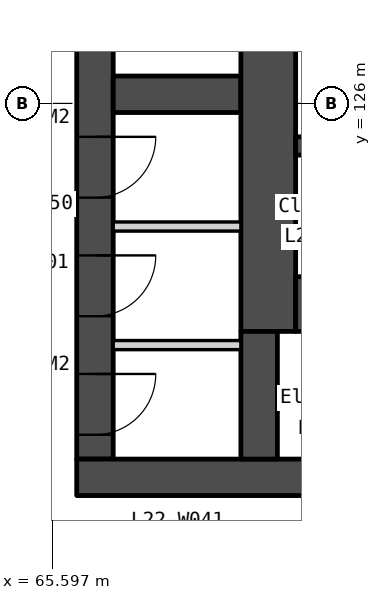
"""IFC4 building model, lengths in metres.
Left out: names, types, materials, properties, quantities, classifications, styles, units other than length and angle.
Written with IfcOpenShell. Run it as: python <this file> out.ifc"""

import sys

from ifc_helpers import new_model, si_unit, direction, frame, frame_2d, origin, place, context, subcontext, project, spatial, polyline, rectangle, outline, extrude, element, fill, save


model = new_model("IFC4")
c1 = context("Model", 3, precision=1e-05, world=origin(), true_north=direction((0.0, 1.0)))
c2 = subcontext(c1, "Body", "Model", "MODEL_VIEW")
j1 = project(units=[si_unit("LENGTHUNIT", "METRE"), si_unit("PLANEANGLEUNIT", "RADIAN")], contexts=[c1])
p1 = place(None, origin())
s1 = spatial("IfcSite", under=j1, at=p1, CompositionType="ELEMENT")
p2 = place(p1, origin())
s2 = spatial("IfcBuilding", under=s1, at=p2, CompositionType="ELEMENT")
p3 = place(p2, frame((0.0, 0.0, 92.3)))
s3 = spatial("IfcBuildingStorey", under=s2, at=p3, CompositionType="ELEMENT", Elevation=92.3)
p4 = place(p3, frame((66.3, 133.95, 0.0), z_axis=(0.0, 0.0, 1.0), x_axis=(0.0, -1.0, 0.0)))
e1 = element("IfcWall", 1, at=p4, inside=s3, PredefinedType="SOLIDWALL", context=c2, shape_type="SweptSolid", body=[
    extrude(rectangle(XDim=13.8, YDim=0.6, at=frame_2d((6.9, 0.0))), origin(), (0.0, 0.0, 1.0), 3.35),
])
p5 = place(p4, frame((0.6, 0.0, 0.0)))
e2 = element("IfcOpeningElement", 2, at=p5, cuts=e1, PredefinedType="OPENING", context=c2, shape_type="SweptSolid", body=[
    extrude(rectangle(XDim=1.1, YDim=2.1, at=frame_2d((0.55, 1.05))), frame((0.0, 0.31, 0.0), z_axis=(0.0, -1.0, 0.0), x_axis=(1.0, 0.0, 0.0)), (0.0, 0.0, 1.0), 0.62),
])
p6 = place(p4, frame((12.4, 0.0, 0.0)))
e3 = element("IfcOpeningElement", 3, at=p6, cuts=e1, PredefinedType="OPENING", context=c2, shape_type="SweptSolid", body=[
    extrude(rectangle(XDim=1.0, YDim=2.1, at=frame_2d((0.5, 1.05))), frame((0.0, 0.31, 0.0), z_axis=(0.0, -1.0, 0.0), x_axis=(1.0, 0.0, 0.0)), (0.0, 0.0, 1.0), 0.62),
])
p7 = place(p4, frame((8.5, 0.0, 0.0)))
e4 = element("IfcOpeningElement", 4, at=p7, cuts=e1, PredefinedType="OPENING", context=c2, shape_type="SweptSolid", body=[
    extrude(rectangle(XDim=1.0, YDim=2.1, at=frame_2d((0.5, 1.05))), frame((0.0, 0.31, 0.0), z_axis=(0.0, -1.0, 0.0), x_axis=(1.0, 0.0, 0.0)), (0.0, 0.0, 1.0), 0.62),
])
p8 = place(p4, frame((10.45, 0.0, 0.0)))
e5 = element("IfcOpeningElement", 5, at=p8, cuts=e1, PredefinedType="OPENING", context=c2, shape_type="SweptSolid", body=[
    extrude(rectangle(XDim=1.0, YDim=2.1, at=frame_2d((0.5, 1.05))), frame((0.0, 0.31, 0.0), z_axis=(0.0, -1.0, 0.0), x_axis=(1.0, 0.0, 0.0)), (0.0, 0.0, 1.0), 0.62),
])
p9 = place(p3, frame((66.0, 119.85, 0.0), z_axis=(0.0, 0.0, 1.0), x_axis=(1.0, 0.0, 0.0)))
e6 = element("IfcWall", 6, at=p9, inside=s3, PredefinedType="SOLIDWALL", context=c2, shape_type="SweptSolid", body=[
    extrude(rectangle(XDim=28.0, YDim=0.6, at=frame_2d((14.0, 0.0))), origin(), (0.0, 0.0, 1.0), 3.35),
])
p10 = place(p9, frame((6.825, 0.0, 0.0)))
e7 = element("IfcOpeningElement", 7, at=p10, cuts=e6, PredefinedType="OPENING", context=c2, shape_type="SweptSolid", body=[
    extrude(rectangle(XDim=1.8, YDim=2.1, at=frame_2d((0.9, 1.05))), frame((0.0, 0.31, 0.0), z_axis=(0.0, -1.0, 0.0), x_axis=(1.0, 0.0, 0.0)), (0.0, 0.0, 1.0), 0.62),
])
p11 = place(p9, frame((15.85, 0.0, 0.0)))
e8 = element("IfcOpeningElement", 8, at=p11, cuts=e6, PredefinedType="OPENING", context=c2, shape_type="SweptSolid", body=[
    extrude(rectangle(XDim=1.5, YDim=2.1, at=frame_2d((0.75, 1.05))), frame((0.0, 0.31, 0.0), z_axis=(0.0, -1.0, 0.0), x_axis=(1.0, 0.0, 0.0)), (0.0, 0.0, 1.0), 0.62),
])
p12 = place(p9, frame((19.375, 0.0, 0.0)))
e9 = element("IfcOpeningElement", 9, at=p12, cuts=e6, PredefinedType="OPENING", context=c2, shape_type="SweptSolid", body=[
    extrude(rectangle(XDim=1.8, YDim=2.1, at=frame_2d((0.9, 1.05))), frame((0.0, 0.31, 0.0), z_axis=(0.0, -1.0, 0.0), x_axis=(1.0, 0.0, 0.0)), (0.0, 0.0, 1.0), 0.62),
])
p13 = place(p9, frame((4.425, 0.0, 0.0)))
e10 = element("IfcOpeningElement", 10, at=p13, cuts=e6, PredefinedType="OPENING", context=c2, shape_type="SweptSolid", body=[
    extrude(rectangle(XDim=1.0, YDim=2.1, at=frame_2d((0.5, 1.05))), frame((0.0, 0.31, 0.0), z_axis=(0.0, -1.0, 0.0), x_axis=(1.0, 0.0, 0.0)), (0.0, 0.0, 1.0), 0.62),
])
p14 = place(p9, frame((9.925, 0.0, 0.0)))
e11 = element("IfcOpeningElement", 11, at=p14, cuts=e6, PredefinedType="OPENING", context=c2, shape_type="SweptSolid", body=[
    extrude(rectangle(XDim=1.0, YDim=2.1, at=frame_2d((0.5, 1.05))), frame((0.0, 0.31, 0.0), z_axis=(0.0, -1.0, 0.0), x_axis=(1.0, 0.0, 0.0)), (0.0, 0.0, 1.0), 0.62),
])
p15 = place(p9, frame((13.125, 0.0, 0.0)))
e12 = element("IfcOpeningElement", 12, at=p15, cuts=e6, PredefinedType="OPENING", context=c2, shape_type="SweptSolid", body=[
    extrude(rectangle(XDim=1.0, YDim=2.1, at=frame_2d((0.5, 1.05))), frame((0.0, 0.31, 0.0), z_axis=(0.0, -1.0, 0.0), x_axis=(1.0, 0.0, 0.0)), (0.0, 0.0, 1.0), 0.62),
])
p16 = place(p9, frame((21.725, 0.0, 0.0)))
e13 = element("IfcOpeningElement", 13, at=p16, cuts=e6, PredefinedType="OPENING", context=c2, shape_type="SweptSolid", body=[
    extrude(rectangle(XDim=1.0, YDim=2.1, at=frame_2d((0.5, 1.05))), frame((0.0, 0.31, 0.0), z_axis=(0.0, -1.0, 0.0), x_axis=(1.0, 0.0, 0.0)), (0.0, 0.0, 1.0), 0.62),
])
p17 = place(p9, frame((23.425, 0.0, 0.0)))
e14 = element("IfcOpeningElement", 14, at=p17, cuts=e6, PredefinedType="OPENING", context=c2, shape_type="SweptSolid", body=[
    extrude(rectangle(XDim=1.0, YDim=2.1, at=frame_2d((0.5, 1.05))), frame((0.0, 0.31, 0.0), z_axis=(0.0, -1.0, 0.0), x_axis=(1.0, 0.0, 0.0)), (0.0, 0.0, 1.0), 0.62),
])
p18 = place(p3, frame((66.6, 126.15, 0.0), z_axis=(0.0, 0.0, 1.0), x_axis=(1.0, 0.0, 0.0)))
e15 = element("IfcWall", 15, at=p18, inside=s3, PredefinedType="SOLIDWALL", context=c2, shape_type="SweptSolid", body=[
    extrude(rectangle(XDim=2.1, YDim=0.6, at=frame_2d((1.05, 0.0))), origin(), (0.0, 0.0, 1.0), 3.35),
])
for number, where, z_axis, x_axis in (
    (16, (66.6, 123.975, 0.0), (0.0, 0.0, 1.0), (1.0, 0.0, 0.0)),
    (17, (66.6, 122.025, 0.0), (0.0, 0.0, 1.0), (1.0, 0.0, 0.0)),
):
    element("IfcWall", number, at=place(p3, frame(where, z_axis=z_axis, x_axis=x_axis)), inside=s3, PredefinedType="PARTITIONING", context=c2, shape_type="SweptSolid", body=[
        extrude(rectangle(XDim=2.1, YDim=0.15, at=frame_2d((1.05, 0.0))), origin(), (0.0, 0.0, 1.0), 3.35),
    ])
p19 = place(p3, frame((69.15, 133.95, 0.0), z_axis=(0.0, 0.0, 1.0), x_axis=(0.0, -1.0, 0.0)))
e18 = element("IfcWall", 18, at=p19, inside=s3, PredefinedType="SOLIDWALL", context=c2, shape_type="SweptSolid", body=[
    extrude(rectangle(XDim=11.7, YDim=0.9, at=frame_2d((5.85, 0.0))), origin(), (0.0, 0.0, 1.0), 3.35),
])
p20 = place(p3, frame((69.0, 122.25, 0.0), z_axis=(0.0, 0.0, 1.0), x_axis=(0.0, -1.0, 0.0)))
e19 = element("IfcWall", 19, at=p20, inside=s3, PredefinedType="SOLIDWALL", context=c2, shape_type="SweptSolid", body=[
    extrude(rectangle(XDim=2.1, YDim=0.6, at=frame_2d((1.05, 0.0))), origin(), (0.0, 0.0, 1.0), 3.35),
])
p21 = place(p3, frame((69.6, 125.3, 0.0), z_axis=(0.0, 0.0, 1.0), x_axis=(1.0, 0.0, 0.0)))
e20 = element("IfcWall", 20, at=p21, inside=s3, PredefinedType="SOLIDWALL", context=c2, shape_type="SweptSolid", body=[
    extrude(rectangle(XDim=2.55, YDim=0.3, at=frame_2d((1.275, 0.0))), origin(), (0.0, 0.0, 1.0), 3.35),
])
p22 = place(p3, frame((69.6, 122.7, 0.0), z_axis=(0.0, 0.0, 1.0), x_axis=(1.0, 0.0, 0.0)))
e21 = element("IfcWall", 21, at=p22, inside=s3, PredefinedType="SOLIDWALL", context=c2, shape_type="SweptSolid", body=[
    extrude(rectangle(XDim=2.55, YDim=0.9, at=frame_2d((1.275, 0.0))), origin(), (0.0, 0.0, 1.0), 3.35),
])
p23 = place(p3, frame((56.073, 130.263, -0.15), z_axis=(0.0, 0.0, 1.0), x_axis=(0.500000478905, -0.866025127289, 0.0)))
e22 = element("IfcWall", 22, at=p23, inside=s3, PredefinedType="SOLIDWALL", context=c2, shape_type="SweptSolid", body=[
    extrude(outline(polyline([(42.643, 0.0), (42.643, 3.5), (0.0, 3.5), (0.0, 0.0), (42.643, 0.0)])), frame((0.0, 0.225, 0.0), z_axis=(0.0, -1.0, 0.0), x_axis=(1.0, 0.0, 0.0)), (0.0, 0.0, 1.0), 0.45),
])
p24 = place(p23, frame((2.814, 0.0, 1.05)))
e23 = element("IfcOpeningElement", 23, at=p24, cuts=e22, PredefinedType="OPENING", context=c2, shape_type="SweptSolid", body=[
    extrude(rectangle(XDim=1.2, YDim=1.5, at=frame_2d((0.6, 0.75))), frame((0.0, 0.235, 0.0), z_axis=(0.0, -1.0, 0.0), x_axis=(1.0, 0.0, 0.0)), (0.0, 0.0, 1.0), 0.47),
])
p25 = place(p23, frame((4.514, 0.0, 1.05)))
e24 = element("IfcOpeningElement", 24, at=p25, cuts=e22, PredefinedType="OPENING", context=c2, shape_type="SweptSolid", body=[
    extrude(rectangle(XDim=1.2, YDim=1.5, at=frame_2d((0.6, 0.75))), frame((0.0, 0.235, 0.0), z_axis=(0.0, -1.0, 0.0), x_axis=(1.0, 0.0, 0.0)), (0.0, 0.0, 1.0), 0.47),
])
p26 = place(p23, frame((11.343, 0.0, 1.05)))
e25 = element("IfcOpeningElement", 25, at=p26, cuts=e22, PredefinedType="OPENING", context=c2, shape_type="SweptSolid", body=[
    extrude(rectangle(XDim=1.2, YDim=1.5, at=frame_2d((0.6, 0.75))), frame((0.0, 0.235, 0.0), z_axis=(0.0, -1.0, 0.0), x_axis=(1.0, 0.0, 0.0)), (0.0, 0.0, 1.0), 0.47),
])
p27 = place(p23, frame((13.043, 0.0, 1.05)))
e26 = element("IfcOpeningElement", 26, at=p27, cuts=e22, PredefinedType="OPENING", context=c2, shape_type="SweptSolid", body=[
    extrude(rectangle(XDim=1.2, YDim=1.5, at=frame_2d((0.6, 0.75))), frame((0.0, 0.235, 0.0), z_axis=(0.0, -1.0, 0.0), x_axis=(1.0, 0.0, 0.0)), (0.0, 0.0, 1.0), 0.47),
])
p28 = place(p23, frame((19.872, 0.0, 1.05)))
e27 = element("IfcOpeningElement", 27, at=p28, cuts=e22, PredefinedType="OPENING", context=c2, shape_type="SweptSolid", body=[
    extrude(rectangle(XDim=1.2, YDim=1.5, at=frame_2d((0.6, 0.75))), frame((0.0, 0.235, 0.0), z_axis=(0.0, -1.0, 0.0), x_axis=(1.0, 0.0, 0.0)), (0.0, 0.0, 1.0), 0.47),
])
p29 = place(p23, frame((21.572, 0.0, 1.05)))
e28 = element("IfcOpeningElement", 28, at=p29, cuts=e22, PredefinedType="OPENING", context=c2, shape_type="SweptSolid", body=[
    extrude(rectangle(XDim=1.2, YDim=1.5, at=frame_2d((0.6, 0.75))), frame((0.0, 0.235, 0.0), z_axis=(0.0, -1.0, 0.0), x_axis=(1.0, 0.0, 0.0)), (0.0, 0.0, 1.0), 0.47),
])
p30 = place(p23, frame((28.4, 0.0, 1.05)))
e29 = element("IfcOpeningElement", 29, at=p30, cuts=e22, PredefinedType="OPENING", context=c2, shape_type="SweptSolid", body=[
    extrude(rectangle(XDim=1.2, YDim=1.5, at=frame_2d((0.6, 0.75))), frame((0.0, 0.235, 0.0), z_axis=(0.0, -1.0, 0.0), x_axis=(1.0, 0.0, 0.0)), (0.0, 0.0, 1.0), 0.47),
])
p31 = place(p23, frame((30.1, 0.0, 1.05)))
e30 = element("IfcOpeningElement", 30, at=p31, cuts=e22, PredefinedType="OPENING", context=c2, shape_type="SweptSolid", body=[
    extrude(rectangle(XDim=1.2, YDim=1.5, at=frame_2d((0.6, 0.75))), frame((0.0, 0.235, 0.0), z_axis=(0.0, -1.0, 0.0), x_axis=(1.0, 0.0, 0.0)), (0.0, 0.0, 1.0), 0.47),
])
p32 = place(p23, frame((36.929, 0.0, 1.05)))
e31 = element("IfcOpeningElement", 31, at=p32, cuts=e22, PredefinedType="OPENING", context=c2, shape_type="SweptSolid", body=[
    extrude(rectangle(XDim=1.2, YDim=1.5, at=frame_2d((0.6, 0.75))), frame((0.0, 0.235, 0.0), z_axis=(0.0, -1.0, 0.0), x_axis=(1.0, 0.0, 0.0)), (0.0, 0.0, 1.0), 0.47),
])
p33 = place(p23, frame((38.629, 0.0, 1.05)))
e32 = element("IfcOpeningElement", 32, at=p33, cuts=e22, PredefinedType="OPENING", context=c2, shape_type="SweptSolid", body=[
    extrude(rectangle(XDim=1.2, YDim=1.5, at=frame_2d((0.6, 0.75))), frame((0.0, 0.235, 0.0), z_axis=(0.0, -1.0, 0.0), x_axis=(1.0, 0.0, 0.0)), (0.0, 0.0, 1.0), 0.47),
])
p34 = place(p6, origin())
e33 = element("IfcDoor", 33, at=p34, inside=s3, OperationType="SINGLE_SWING_LEFT", PredefinedType="DOOR", context=c2, shape_type="SweptSolid", body=[
    extrude(rectangle(XDim=1.0, YDim=2.1, at=frame_2d((0.5, 1.05))), frame((0.0, 0.025, 0.0), z_axis=(0.0, -1.0, 0.0), x_axis=(1.0, 0.0, 0.0)), (0.0, 0.0, 1.0), 0.05),
])
fill(e3, e33)
p35 = place(p7, origin())
e34 = element("IfcDoor", 34, at=p35, inside=s3, OperationType="SINGLE_SWING_LEFT", PredefinedType="DOOR", context=c2, shape_type="SweptSolid", body=[
    extrude(rectangle(XDim=1.0, YDim=2.1, at=frame_2d((0.5, 1.05))), frame((0.0, 0.025, 0.0), z_axis=(0.0, -1.0, 0.0), x_axis=(1.0, 0.0, 0.0)), (0.0, 0.0, 1.0), 0.05),
])
fill(e4, e34)
p36 = place(p8, origin())
e35 = element("IfcDoor", 35, at=p36, inside=s3, OperationType="SINGLE_SWING_LEFT", PredefinedType="DOOR", context=c2, shape_type="SweptSolid", body=[
    extrude(rectangle(XDim=1.0, YDim=2.1, at=frame_2d((0.5, 1.05))), frame((0.0, 0.025, 0.0), z_axis=(0.0, -1.0, 0.0), x_axis=(1.0, 0.0, 0.0)), (0.0, 0.0, 1.0), 0.05),
])
fill(e5, e35)
save(model, sys.argv[1])
